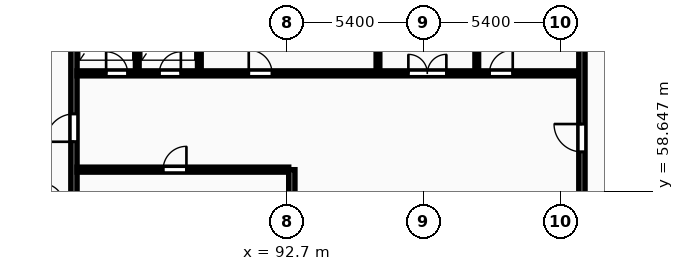
"""IFC4 building model, lengths in metres.
Left out: names, types, materials, properties, quantities, classifications, styles, units other than length and angle.
Written with IfcOpenShell. Run it as: python <this file> out.ifc"""

import sys

from ifc_helpers import new_model, si_unit, direction, frame, frame_2d, origin, place, context, subcontext, project, spatial, rectangle, extrude, element, fill, save


model = new_model("IFC4")
c1 = context("Model", 3, precision=1e-05, world=origin(), true_north=direction((0.0, 1.0)))
c2 = subcontext(c1, "Body", "Model", "MODEL_VIEW")
j1 = project(units=[si_unit("LENGTHUNIT", "METRE"), si_unit("PLANEANGLEUNIT", "RADIAN")], contexts=[c1])
p1 = place(None, origin())
s1 = spatial("IfcSite", under=j1, at=p1, CompositionType="ELEMENT")
p2 = place(p1, origin())
s2 = spatial("IfcBuilding", under=s1, at=p2, CompositionType="ELEMENT")
p3 = place(p2, frame((0.0, 0.0, 126.3)))
s3 = spatial("IfcBuildingStorey", under=s2, at=p3, CompositionType="ELEMENT", Elevation=126.3)
p4 = place(p3, frame((84.3, 55.4, 0.0), z_axis=(0.0, 0.0, 1.0), x_axis=(0.0, 1.0, 0.0)))
e1 = element("IfcWall", 1, at=p4, inside=s3, PredefinedType="SHEAR", context=c2, shape_type="SweptSolid", body=[
    extrude(rectangle(XDim=11.6, YDim=0.25, at=frame_2d((5.8, 0.0))), origin(), (0.0, 0.0, 1.0), 3.25),
])
p5 = place(p4, frame((5.2, 0.0, 0.0)))
e2 = element("IfcOpeningElement", 2, at=p5, cuts=e1, PredefinedType="OPENING", context=c2, shape_type="SweptSolid", body=[
    extrude(rectangle(XDim=1.1, YDim=2.1, at=frame_2d((0.55, 1.05))), frame((0.0, 0.135, 0.0), z_axis=(0.0, -1.0, 0.0), x_axis=(1.0, 0.0, 0.0)), (0.0, 0.0, 1.0), 0.27),
])
p6 = place(p3, frame((84.42, 59.5, 0.0), z_axis=(0.0, 0.0, 1.0), x_axis=(1.0, 0.0, 0.0)))
e3 = element("IfcWall", 3, at=p6, inside=s3, PredefinedType="PARTITIONING", context=c2, shape_type="SweptSolid", body=[
    extrude(rectangle(XDim=8.36, YDim=0.2, at=frame_2d((4.18, 0.0))), origin(), (0.0, 0.0, 1.0), 2.97),
])
p7 = place(p6, frame((3.4, 0.0, 0.0)))
e4 = element("IfcOpeningElement", 4, at=p7, cuts=e3, PredefinedType="OPENING", context=c2, shape_type="SweptSolid", body=[
    extrude(rectangle(XDim=0.92, YDim=2.08, at=frame_2d((0.46, 1.04))), frame((0.0, 0.11, 0.0), z_axis=(0.0, -1.0, 0.0), x_axis=(1.0, 0.0, 0.0)), (0.0, 0.0, 1.0), 0.22),
])
p8 = place(p3, frame((92.9, 55.4, 0.0), z_axis=(0.0, 0.0, 1.0), x_axis=(0.0, 1.0, 0.0)))
e5 = element("IfcWall", 5, at=p8, inside=s3, PredefinedType="SHEAR", context=c2, shape_type="SweptSolid", body=[
    extrude(rectangle(XDim=4.1, YDim=0.25, at=frame_2d((2.05, 0.0))), origin(), (0.0, 0.0, 1.0), 3.25),
])
for number, where, z_axis, x_axis in (
    (6, (86.8, 63.4, 0.0), (0.0, 0.0, 1.0), (0.0, 1.0, 0.0)),
    (7, (89.25, 63.4, 0.0), (0.0, 0.0, 1.0), (0.0, 1.0, 0.0)),
    (8, (96.3, 63.4, 0.0), (0.0, 0.0, 1.0), (0.0, 1.0, 0.0)),
    (9, (100.2, 63.4, 0.0), (0.0, 0.0, 1.0), (0.0, 1.0, 0.0)),
):
    element("IfcWall", number, at=place(p3, frame(where, z_axis=z_axis, x_axis=x_axis)), inside=s3, PredefinedType="PARTITIONING", context=c2, shape_type="SweptSolid", body=[
        extrude(rectangle(XDim=3.6, YDim=0.15, at=frame_2d((1.8, 0.0))), origin(), (0.0, 0.0, 1.0), 2.97),
    ])
p9 = place(p3, frame((84.42, 63.3, 0.0), z_axis=(0.0, 0.0, 1.0), x_axis=(1.0, 0.0, 0.0)))
e10 = element("IfcWall", 10, at=p9, inside=s3, PredefinedType="PARTITIONING", context=c2, shape_type="SweptSolid", body=[
    extrude(rectangle(XDim=19.83, YDim=0.2, at=frame_2d((9.915, 0.0))), origin(), (0.0, 0.0, 1.0), 2.97),
])
p10 = place(p9, frame((1.15, 0.0, 0.0)))
e11 = element("IfcOpeningElement", 11, at=p10, cuts=e10, PredefinedType="OPENING", context=c2, shape_type="SweptSolid", body=[
    extrude(rectangle(XDim=0.85, YDim=2.05, at=frame_2d((0.425, 1.025))), frame((0.0, 0.11, 0.0), z_axis=(0.0, -1.0, 0.0), x_axis=(1.0, 0.0, 0.0)), (0.0, 0.0, 1.0), 0.22),
])
p11 = place(p9, frame((3.25, 0.0, 0.0)))
e12 = element("IfcOpeningElement", 12, at=p11, cuts=e10, PredefinedType="OPENING", context=c2, shape_type="SweptSolid", body=[
    extrude(rectangle(XDim=0.85, YDim=2.05, at=frame_2d((0.425, 1.025))), frame((0.0, 0.11, 0.0), z_axis=(0.0, -1.0, 0.0), x_axis=(1.0, 0.0, 0.0)), (0.0, 0.0, 1.0), 0.22),
])
p12 = place(p9, frame((13.08, 0.0, 0.0)))
e13 = element("IfcOpeningElement", 13, at=p12, cuts=e10, PredefinedType="OPENING", context=c2, shape_type="SweptSolid", body=[
    extrude(rectangle(XDim=1.5, YDim=2.2, at=frame_2d((0.75, 1.1))), frame((0.0, 0.11, 0.0), z_axis=(0.0, -1.0, 0.0), x_axis=(1.0, 0.0, 0.0)), (0.0, 0.0, 1.0), 0.22),
])
p13 = place(p9, frame((6.78, 0.0, 0.0)))
e14 = element("IfcOpeningElement", 14, at=p13, cuts=e10, PredefinedType="OPENING", context=c2, shape_type="SweptSolid", body=[
    extrude(rectangle(XDim=0.92, YDim=2.08, at=frame_2d((0.46, 1.04))), frame((0.0, 0.11, 0.0), z_axis=(0.0, -1.0, 0.0), x_axis=(1.0, 0.0, 0.0)), (0.0, 0.0, 1.0), 0.22),
])
p14 = place(p9, frame((16.28, 0.0, 0.0)))
e15 = element("IfcOpeningElement", 15, at=p14, cuts=e10, PredefinedType="OPENING", context=c2, shape_type="SweptSolid", body=[
    extrude(rectangle(XDim=0.92, YDim=2.08, at=frame_2d((0.46, 1.04))), frame((0.0, 0.11, 0.0), z_axis=(0.0, -1.0, 0.0), x_axis=(1.0, 0.0, 0.0)), (0.0, 0.0, 1.0), 0.22),
])
p15 = place(p3, frame((104.35, 58.4, 0.0), z_axis=(0.0, 0.0, 1.0), x_axis=(0.0, 1.0, 0.0)))
e16 = element("IfcWall", 16, at=p15, inside=s3, PredefinedType="SHEAR", context=c2, shape_type="SweptSolid", body=[
    extrude(rectangle(XDim=8.6, YDim=0.25, at=frame_2d((4.3, 0.0))), origin(), (0.0, 0.0, 1.0), 3.25),
])
p16 = place(p15, frame((1.8, 0.0, 0.0)))
e17 = element("IfcOpeningElement", 17, at=p16, cuts=e16, PredefinedType="OPENING", context=c2, shape_type="SweptSolid", body=[
    extrude(rectangle(XDim=1.1, YDim=2.1, at=frame_2d((0.55, 1.05))), frame((0.0, 0.135, 0.0), z_axis=(0.0, -1.0, 0.0), x_axis=(1.0, 0.0, 0.0)), (0.0, 0.0, 1.0), 0.27),
])
p17 = place(p5, origin())
e18 = element("IfcDoor", 18, at=p17, inside=s3, OperationType="SINGLE_SWING_LEFT", PredefinedType="DOOR", context=c2, shape_type="SweptSolid", body=[
    extrude(rectangle(XDim=1.1, YDim=2.1, at=frame_2d((0.55, 1.05))), frame((0.0, 0.025, 0.0), z_axis=(0.0, -1.0, 0.0), x_axis=(1.0, 0.0, 0.0)), (0.0, 0.0, 1.0), 0.05),
])
fill(e2, e18)
p18 = place(p7, origin())
e19 = element("IfcDoor", 19, at=p18, inside=s3, OperationType="SINGLE_SWING_RIGHT", PredefinedType="DOOR", context=c2, shape_type="SweptSolid", body=[
    extrude(rectangle(XDim=0.92, YDim=2.08, at=frame_2d((0.46, 1.04))), frame((0.0, 0.025, 0.0), z_axis=(0.0, -1.0, 0.0), x_axis=(1.0, 0.0, 0.0)), (0.0, 0.0, 1.0), 0.05),
])
fill(e4, e19)
p19 = place(p10, origin())
e20 = element("IfcDoor", 20, at=p19, inside=s3, OperationType="SINGLE_SWING_LEFT", PredefinedType="DOOR", context=c2, shape_type="SweptSolid", body=[
    extrude(rectangle(XDim=0.85, YDim=2.05, at=frame_2d((0.425, 1.025))), frame((0.0, 0.025, 0.0), z_axis=(0.0, -1.0, 0.0), x_axis=(1.0, 0.0, 0.0)), (0.0, 0.0, 1.0), 0.05),
])
fill(e11, e20)
p20 = place(p11, origin())
e21 = element("IfcDoor", 21, at=p20, inside=s3, OperationType="SINGLE_SWING_RIGHT", PredefinedType="DOOR", context=c2, shape_type="SweptSolid", body=[
    extrude(rectangle(XDim=0.85, YDim=2.05, at=frame_2d((0.425, 1.025))), frame((0.0, 0.025, 0.0), z_axis=(0.0, -1.0, 0.0), x_axis=(1.0, 0.0, 0.0)), (0.0, 0.0, 1.0), 0.05),
])
fill(e12, e21)
p21 = place(p12, origin())
e22 = element("IfcDoor", 22, at=p21, inside=s3, OperationType="DOUBLE_DOOR_SINGLE_SWING", PredefinedType="DOOR", context=c2, shape_type="SweptSolid", body=[
    extrude(rectangle(XDim=1.5, YDim=2.2, at=frame_2d((0.75, 1.1))), frame((0.0, 0.025, 0.0), z_axis=(0.0, -1.0, 0.0), x_axis=(1.0, 0.0, 0.0)), (0.0, 0.0, 1.0), 0.05),
])
fill(e13, e22)
p22 = place(p13, origin())
e23 = element("IfcDoor", 23, at=p22, inside=s3, OperationType="SINGLE_SWING_LEFT", PredefinedType="DOOR", context=c2, shape_type="SweptSolid", body=[
    extrude(rectangle(XDim=0.92, YDim=2.08, at=frame_2d((0.46, 1.04))), frame((0.0, 0.025, 0.0), z_axis=(0.0, -1.0, 0.0), x_axis=(1.0, 0.0, 0.0)), (0.0, 0.0, 1.0), 0.05),
])
fill(e14, e23)
p23 = place(p14, origin())
e24 = element("IfcDoor", 24, at=p23, inside=s3, OperationType="SINGLE_SWING_RIGHT", PredefinedType="DOOR", context=c2, shape_type="SweptSolid", body=[
    extrude(rectangle(XDim=0.92, YDim=2.08, at=frame_2d((0.46, 1.04))), frame((0.0, 0.025, 0.0), z_axis=(0.0, -1.0, 0.0), x_axis=(1.0, 0.0, 0.0)), (0.0, 0.0, 1.0), 0.05),
])
fill(e15, e24)
p24 = place(p16, origin())
e25 = element("IfcDoor", 25, at=p24, inside=s3, OperationType="SINGLE_SWING_RIGHT", PredefinedType="DOOR", context=c2, shape_type="SweptSolid", body=[
    extrude(rectangle(XDim=1.1, YDim=2.1, at=frame_2d((0.55, 1.05))), frame((0.0, 0.025, 0.0), z_axis=(0.0, -1.0, 0.0), x_axis=(1.0, 0.0, 0.0)), (0.0, 0.0, 1.0), 0.05),
])
fill(e17, e25)
save(model, sys.argv[1])
